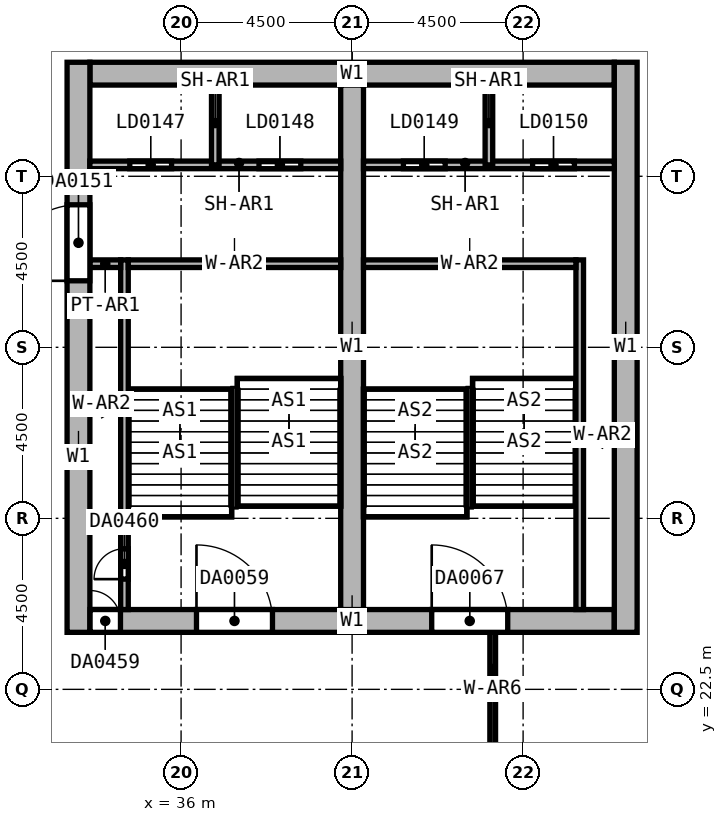
"""IFC4 building model, lengths in metres.
Left out: names, types, materials, properties, quantities, classifications, styles, units other than length and angle.
Written with IfcOpenShell. Run it as: python <this file> out.ifc"""

import sys

from ifc_helpers import new_model, si_unit, direction, frame, frame_2d, origin, place, context, subcontext, project, spatial, rectangle, extrude, element, fill, save


model = new_model("IFC4")
c1 = context("Model", 3, precision=1e-05, world=origin(), true_north=direction((0.0, 1.0)))
c2 = subcontext(c1, "Body", "Model", "MODEL_VIEW")
j1 = project(units=[si_unit("LENGTHUNIT", "METRE"), si_unit("PLANEANGLEUNIT", "RADIAN")], contexts=[c1])
p1 = place(None, origin())
s1 = spatial("IfcSite", under=j1, at=p1, CompositionType="ELEMENT")
p2 = place(p1, origin())
s2 = spatial("IfcBuilding", under=s1, at=p2, CompositionType="ELEMENT")
p3 = place(p2, frame((0.0, 0.0, 44.0)))
s3 = spatial("IfcBuildingStorey", under=s2, at=p3, CompositionType="ELEMENT", Elevation=44.0)
p4 = place(p3, frame((33.6, 38.7, 0.0), z_axis=(0.0, 0.0, 1.0), x_axis=(1.0, 0.0, 0.0)))
e1 = element("IfcWall", 1, at=p4, inside=s3, PredefinedType="SHEAR", context=c2, shape_type="SweptSolid", body=[
    extrude(rectangle(XDim=13.8, YDim=0.6, at=frame_2d((6.9, 0.0))), origin(), (0.0, 0.0, 1.0), 8.0),
])
p5 = place(p3, frame((33.6, 24.3, 0.0), z_axis=(0.0, 0.0, 1.0), x_axis=(1.0, 0.0, 0.0)))
e2 = element("IfcWall", 2, at=p5, inside=s3, PredefinedType="SHEAR", context=c2, shape_type="SweptSolid", body=[
    extrude(rectangle(XDim=13.8, YDim=0.6, at=frame_2d((6.9, 0.0))), origin(), (0.0, 0.0, 1.0), 8.0),
])
p6 = place(p5, frame((2.805, 0.0, 0.0)))
e3 = element("IfcOpeningElement", 3, at=p6, cuts=e2, PredefinedType="OPENING", context=c2, shape_type="SweptSolid", body=[
    extrude(rectangle(XDim=2.0, YDim=2.4, at=frame_2d((1.0, 1.2))), frame((0.0, 0.3, 0.0), z_axis=(0.0, -1.0, 0.0), x_axis=(1.0, 0.0, 0.0)), (0.0, 0.0, 1.0), 0.6),
])
p7 = place(p5, frame((8.995, 0.0, 0.0)))
e4 = element("IfcOpeningElement", 4, at=p7, cuts=e2, PredefinedType="OPENING", context=c2, shape_type="SweptSolid", body=[
    extrude(rectangle(XDim=2.0, YDim=2.4, at=frame_2d((1.0, 1.2))), frame((0.0, 0.3, 0.0), z_axis=(0.0, -1.0, 0.0), x_axis=(1.0, 0.0, 0.0)), (0.0, 0.0, 1.0), 0.6),
])
p8 = place(p5, frame((0.005, 0.0, 0.0)))
e5 = element("IfcOpeningElement", 5, at=p8, cuts=e2, PredefinedType="OPENING", context=c2, shape_type="SweptSolid", body=[
    extrude(rectangle(XDim=0.8, YDim=2.1, at=frame_2d((0.4, 1.05))), frame((0.0, 0.3, 0.0), z_axis=(0.0, -1.0, 0.0), x_axis=(1.0, 0.0, 0.0)), (0.0, 0.0, 1.0), 0.6),
])
p9 = place(p3, frame((33.3, 24.0, 0.0), z_axis=(0.0, 0.0, 1.0), x_axis=(0.0, 1.0, 0.0)))
e6 = element("IfcWall", 6, at=p9, inside=s3, PredefinedType="SHEAR", context=c2, shape_type="SweptSolid", body=[
    extrude(rectangle(XDim=15.0, YDim=0.6, at=frame_2d((7.5, 0.0))), origin(), (0.0, 0.0, 1.0), 8.0),
])
p10 = place(p9, frame((9.25, 0.0, 0.0)))
e7 = element("IfcOpeningElement", 7, at=p10, cuts=e6, PredefinedType="OPENING", context=c2, shape_type="SweptSolid", body=[
    extrude(rectangle(XDim=2.0, YDim=2.4, at=frame_2d((1.0, 1.2))), frame((0.0, 0.3, 0.0), z_axis=(0.0, -1.0, 0.0), x_axis=(1.0, 0.0, 0.0)), (0.0, 0.0, 1.0), 0.6),
])
p11 = place(p3, frame((47.7, 24.0, 0.0), z_axis=(0.0, 0.0, 1.0), x_axis=(0.0, 1.0, 0.0)))
e8 = element("IfcWall", 8, at=p11, inside=s3, PredefinedType="SHEAR", context=c2, shape_type="SweptSolid", body=[
    extrude(rectangle(XDim=15.0, YDim=0.6, at=frame_2d((7.5, 0.0))), origin(), (0.0, 0.0, 1.0), 8.0),
])
p12 = place(p3, frame((40.5, 24.6, 0.0), z_axis=(0.0, 0.0, 1.0), x_axis=(0.0, 1.0, 0.0)))
e9 = element("IfcWall", 9, at=p12, inside=s3, PredefinedType="SHEAR", context=c2, shape_type="SweptSolid", body=[
    extrude(rectangle(XDim=13.8, YDim=0.6, at=frame_2d((6.9, 0.0))), origin(), (0.0, 0.0, 1.0), 8.0),
])
p13 = place(p3, frame((34.51, 24.6, 0.0), z_axis=(0.0, 0.0, 1.0), x_axis=(0.0, 1.0, 0.0)))
e10 = element("IfcWall", 10, at=p13, inside=s3, PredefinedType="SOLIDWALL", context=c2, shape_type="SweptSolid", body=[
    extrude(rectangle(XDim=9.2, YDim=0.2, at=frame_2d((4.6, 0.0))), origin(), (0.0, 0.0, 1.0), 8.0),
])
p14 = place(p13, frame((0.8, 0.0, 0.0)))
e11 = element("IfcOpeningElement", 11, at=p14, cuts=e10, PredefinedType="OPENING", context=c2, shape_type="SweptSolid", body=[
    extrude(rectangle(XDim=0.8, YDim=2.1, at=frame_2d((0.4, 1.05))), frame((0.0, 0.1, 0.0), z_axis=(0.0, -1.0, 0.0), x_axis=(1.0, 0.0, 0.0)), (0.0, 0.0, 1.0), 0.2),
])
p15 = place(p3, frame((34.61, 33.7, 0.0), z_axis=(0.0, 0.0, 1.0), x_axis=(1.0, 0.0, 0.0)))
e12 = element("IfcWall", 12, at=p15, inside=s3, PredefinedType="SOLIDWALL", context=c2, shape_type="SweptSolid", body=[
    extrude(rectangle(XDim=5.59, YDim=0.2, at=frame_2d((2.795, 0.0))), origin(), (0.0, 0.0, 1.0), 8.0),
])
p16 = place(p3, frame((46.49, 24.6, 0.0), z_axis=(0.0, 0.0, 1.0), x_axis=(0.0, 1.0, 0.0)))
e13 = element("IfcWall", 13, at=p16, inside=s3, PredefinedType="SOLIDWALL", context=c2, shape_type="SweptSolid", body=[
    extrude(rectangle(XDim=9.2, YDim=0.2, at=frame_2d((4.6, 0.0))), origin(), (0.0, 0.0, 1.0), 8.0),
])
p17 = place(p3, frame((40.8, 33.7, 0.0), z_axis=(0.0, 0.0, 1.0), x_axis=(1.0, 0.0, 0.0)))
e14 = element("IfcWall", 14, at=p17, inside=s3, PredefinedType="SOLIDWALL", context=c2, shape_type="SweptSolid", body=[
    extrude(rectangle(XDim=5.59, YDim=0.2, at=frame_2d((2.795, 0.0))), origin(), (0.0, 0.0, 1.0), 8.0),
])
p18 = place(p3, frame((33.6, 36.3, 0.0), z_axis=(0.0, 0.0, 1.0), x_axis=(1.0, 0.0, 0.0)))
e15 = element("IfcWall", 15, at=p18, inside=s3, PredefinedType="SHEAR", context=c2, shape_type="SweptSolid", body=[
    extrude(rectangle(XDim=6.6, YDim=0.2, at=frame_2d((3.3, 0.0))), origin(), (0.0, 0.0, 1.0), 8.0),
])
p19 = place(p18, frame((1.05, 0.0, 0.0)))
e16 = element("IfcOpeningElement", 16, at=p19, cuts=e15, PredefinedType="OPENING", context=c2, shape_type="SweptSolid", body=[
    extrude(rectangle(XDim=1.1, YDim=2.4, at=frame_2d((0.55, 1.2))), frame((0.0, 0.1, 0.0), z_axis=(0.0, -1.0, 0.0), x_axis=(1.0, 0.0, 0.0)), (0.0, 0.0, 1.0), 0.2),
])
p20 = place(p18, frame((4.45, 0.0, 0.0)))
e17 = element("IfcOpeningElement", 17, at=p20, cuts=e15, PredefinedType="OPENING", context=c2, shape_type="SweptSolid", body=[
    extrude(rectangle(XDim=1.1, YDim=2.4, at=frame_2d((0.55, 1.2))), frame((0.0, 0.1, 0.0), z_axis=(0.0, -1.0, 0.0), x_axis=(1.0, 0.0, 0.0)), (0.0, 0.0, 1.0), 0.2),
])
p21 = place(p3, frame((40.8, 36.3, 0.0), z_axis=(0.0, 0.0, 1.0), x_axis=(1.0, 0.0, 0.0)))
e18 = element("IfcWall", 18, at=p21, inside=s3, PredefinedType="SHEAR", context=c2, shape_type="SweptSolid", body=[
    extrude(rectangle(XDim=6.6, YDim=0.2, at=frame_2d((3.3, 0.0))), origin(), (0.0, 0.0, 1.0), 8.0),
])
p22 = place(p21, frame((1.05, 0.0, 0.0)))
e19 = element("IfcOpeningElement", 19, at=p22, cuts=e18, PredefinedType="OPENING", context=c2, shape_type="SweptSolid", body=[
    extrude(rectangle(XDim=1.1, YDim=2.4, at=frame_2d((0.55, 1.2))), frame((0.0, 0.1, 0.0), z_axis=(0.0, -1.0, 0.0), x_axis=(1.0, 0.0, 0.0)), (0.0, 0.0, 1.0), 0.2),
])
p23 = place(p21, frame((4.45, 0.0, 0.0)))
e20 = element("IfcOpeningElement", 20, at=p23, cuts=e18, PredefinedType="OPENING", context=c2, shape_type="SweptSolid", body=[
    extrude(rectangle(XDim=1.1, YDim=2.4, at=frame_2d((0.55, 1.2))), frame((0.0, 0.1, 0.0), z_axis=(0.0, -1.0, 0.0), x_axis=(1.0, 0.0, 0.0)), (0.0, 0.0, 1.0), 0.2),
])
for number, where, z_axis, x_axis in (
    (21, (36.9, 36.3, 0.0), (0.0, 0.0, 1.0), (0.0, 1.0, 0.0)),
    (22, (44.1, 36.3, 0.0), (0.0, 0.0, 1.0), (0.0, 1.0, 0.0)),
):
    element("IfcWall", number, at=place(p3, frame(where, z_axis=z_axis, x_axis=x_axis)), inside=s3, PredefinedType="SHEAR", context=c2, shape_type="SweptSolid", body=[
        extrude(rectangle(XDim=2.1, YDim=0.2, at=frame_2d((1.05, 0.0))), origin(), (0.0, 0.0, 1.0), 8.0),
    ])
p24 = place(p3, frame((33.6, 33.7, 0.0), z_axis=(0.0, 0.0, 1.0), x_axis=(1.0, 0.0, 0.0)))
e23 = element("IfcWall", 23, at=p24, inside=s3, PredefinedType="PARTITIONING", context=c2, shape_type="SweptSolid", body=[
    extrude(rectangle(XDim=0.81, YDim=0.2, at=frame_2d((0.405, 0.0))), origin(), (0.0, 0.0, 1.0), 8.0),
])
p25 = place(p3, frame((44.2, 21.0, 0.0), z_axis=(0.0, 0.0, 1.0), x_axis=(0.0, 1.0, 0.0)))
e24 = element("IfcWall", 24, at=p25, inside=s3, PredefinedType="SOLIDWALL", context=c2, shape_type="SweptSolid", body=[
    extrude(rectangle(XDim=3.0, YDim=0.15, at=frame_2d((1.5, 0.0))), origin(), (0.0, 0.0, 1.0), 7.7),
])
p26 = place(p6, origin())
e25 = element("IfcDoor", 25, at=p26, inside=s3, OperationType="DOUBLE_DOOR_SINGLE_SWING", PredefinedType="DOOR", context=c2, shape_type="SweptSolid", body=[
    extrude(rectangle(XDim=2.0, YDim=2.4, at=frame_2d((1.0, 1.2))), frame((0.0, 0.025, 0.0), z_axis=(0.0, -1.0, 0.0), x_axis=(1.0, 0.0, 0.0)), (0.0, 0.0, 1.0), 0.05),
])
fill(e3, e25)
p27 = place(p7, origin())
e26 = element("IfcDoor", 26, at=p27, inside=s3, OperationType="DOUBLE_DOOR_SINGLE_SWING", PredefinedType="DOOR", context=c2, shape_type="SweptSolid", body=[
    extrude(rectangle(XDim=2.0, YDim=2.4, at=frame_2d((1.0, 1.2))), frame((0.0, 0.025, 0.0), z_axis=(0.0, -1.0, 0.0), x_axis=(1.0, 0.0, 0.0)), (0.0, 0.0, 1.0), 0.05),
])
fill(e4, e26)
p28 = place(p19, origin())
e27 = element("IfcDoor", 27, at=p28, inside=s3, OperationType="DOUBLE_DOOR_SLIDING", PredefinedType="DOOR", context=c2, shape_type="SweptSolid", body=[
    extrude(rectangle(XDim=1.1, YDim=2.4, at=frame_2d((0.55, 1.2))), frame((0.0, 0.025, 0.0), z_axis=(0.0, -1.0, 0.0), x_axis=(1.0, 0.0, 0.0)), (0.0, 0.0, 1.0), 0.05),
])
fill(e16, e27)
p29 = place(p20, origin())
e28 = element("IfcDoor", 28, at=p29, inside=s3, OperationType="DOUBLE_DOOR_SLIDING", PredefinedType="DOOR", context=c2, shape_type="SweptSolid", body=[
    extrude(rectangle(XDim=1.1, YDim=2.4, at=frame_2d((0.55, 1.2))), frame((0.0, 0.025, 0.0), z_axis=(0.0, -1.0, 0.0), x_axis=(1.0, 0.0, 0.0)), (0.0, 0.0, 1.0), 0.05),
])
fill(e17, e28)
p30 = place(p22, origin())
e29 = element("IfcDoor", 29, at=p30, inside=s3, OperationType="DOUBLE_DOOR_SLIDING", PredefinedType="DOOR", context=c2, shape_type="SweptSolid", body=[
    extrude(rectangle(XDim=1.1, YDim=2.4, at=frame_2d((0.55, 1.2))), frame((0.0, 0.025, 0.0), z_axis=(0.0, -1.0, 0.0), x_axis=(1.0, 0.0, 0.0)), (0.0, 0.0, 1.0), 0.05),
])
fill(e19, e29)
p31 = place(p23, origin())
e30 = element("IfcDoor", 30, at=p31, inside=s3, OperationType="DOUBLE_DOOR_SLIDING", PredefinedType="DOOR", context=c2, shape_type="SweptSolid", body=[
    extrude(rectangle(XDim=1.1, YDim=2.4, at=frame_2d((0.55, 1.2))), frame((0.0, 0.025, 0.0), z_axis=(0.0, -1.0, 0.0), x_axis=(1.0, 0.0, 0.0)), (0.0, 0.0, 1.0), 0.05),
])
fill(e20, e30)
p32 = place(p10, origin())
e31 = element("IfcDoor", 31, at=p32, inside=s3, OperationType="DOUBLE_DOOR_SINGLE_SWING", PredefinedType="DOOR", context=c2, shape_type="SweptSolid", body=[
    extrude(rectangle(XDim=2.0, YDim=2.4, at=frame_2d((1.0, 1.2))), frame((0.0, 0.025, 0.0), z_axis=(0.0, -1.0, 0.0), x_axis=(1.0, 0.0, 0.0)), (0.0, 0.0, 1.0), 0.05),
])
fill(e7, e31)
p33 = place(p8, origin())
e32 = element("IfcDoor", 32, at=p33, inside=s3, OperationType="SINGLE_SWING_LEFT", PredefinedType="DOOR", context=c2, shape_type="SweptSolid", body=[
    extrude(rectangle(XDim=0.8, YDim=2.1, at=frame_2d((0.4, 1.05))), frame((0.0, 0.025, 0.0), z_axis=(0.0, -1.0, 0.0), x_axis=(1.0, 0.0, 0.0)), (0.0, 0.0, 1.0), 0.05),
])
fill(e5, e32)
p34 = place(p14, origin())
e33 = element("IfcDoor", 33, at=p34, inside=s3, OperationType="SINGLE_SWING_LEFT", PredefinedType="DOOR", context=c2, shape_type="SweptSolid", body=[
    extrude(rectangle(XDim=0.8, YDim=2.1, at=frame_2d((0.4, 1.05))), frame((0.0, 0.025, 0.0), z_axis=(0.0, -1.0, 0.0), x_axis=(1.0, 0.0, 0.0)), (0.0, 0.0, 1.0), 0.05),
])
fill(e11, e33)
save(model, sys.argv[1])
